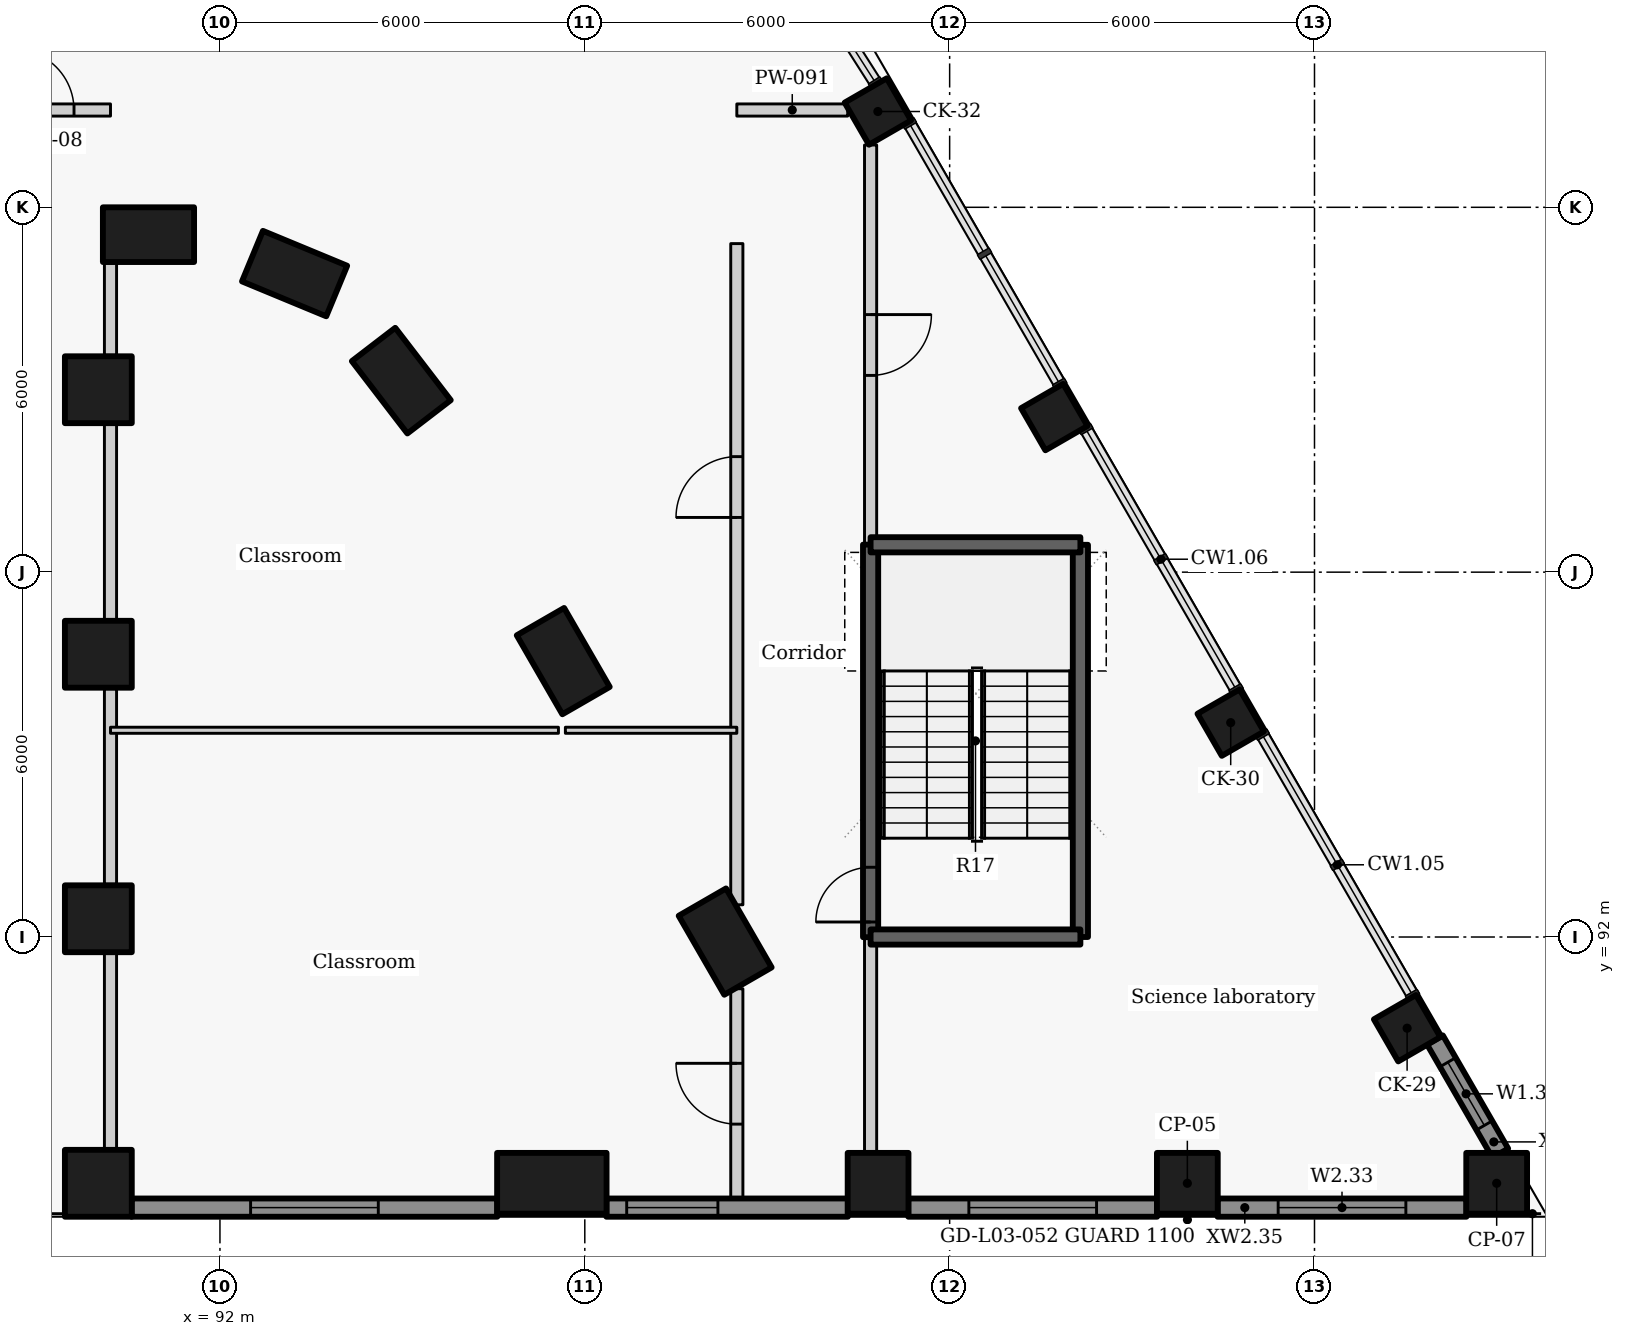
"""IFC4 building model, lengths in metres.
Left out: names, types, materials, properties, quantities, classifications, styles, units other than length and angle.
Written with IfcOpenShell. Run it as: python <this file> out.ifc"""

import sys

from ifc_helpers import new_model, si_unit, direction, frame, frame_2d, origin, origin_2d, place, context, subcontext, project, spatial, rectangle, extrude, element, fill, save


model = new_model("IFC4")
c1 = context("Model", 3, precision=1e-05, world=origin(), true_north=direction((0.0, 1.0)))
c2 = subcontext(c1, "Body", "Model", "MODEL_VIEW")
j1 = project(units=[si_unit("LENGTHUNIT", "METRE"), si_unit("PLANEANGLEUNIT", "RADIAN")], contexts=[c1])
p1 = place(None, origin())
s1 = spatial("IfcSite", under=j1, at=p1, CompositionType="ELEMENT")
p2 = place(p1, origin())
s2 = spatial("IfcBuilding", under=s1, at=p2, CompositionType="ELEMENT")
p3 = place(p2, frame((0.0, 0.0, 15.6)))
s3 = spatial("IfcBuildingStorey", under=s2, at=p3, CompositionType="ELEMENT", Elevation=15.6)
for number, where, z_axis, x_axis in (
    (1, (100.308, 91.925, 0.0), (0.0, 0.0, 1.0), (-0.5, 0.866, 0.0)),
    (2, (97.646, 96.537, 0.0), (0.0, 0.0, 1.0), (-0.5, 0.866, 0.0)),
    (3, (94.982, 101.149, 0.0), (0.0, 0.0, 1.0), (-0.609, 0.793, 0.0)),
    (4, (93.227, 102.91, 0.0), (0.0, 0.0, 1.0), (-0.924, 0.383, 0.0)),
    (5, (90.825, 103.55, 0.0), (0.0, 0.0, 1.0), (-1.0, 0.0, 0.0)),
):
    element("IfcColumn", number, at=place(p3, frame(where, z_axis=z_axis, x_axis=x_axis)), inside=s3, PredefinedType="COLUMN", context=c2, shape_type="SweptSolid", body=[
        extrude(rectangle(XDim=1.5, YDim=0.9, at=origin_2d()), origin(), (0.0, 0.0, 1.0), 4.2),
    ])
for number, where, z_axis, x_axis in (
    (6, (90.0, 87.95, 0.0), (0.0, 0.0, 1.0), (0.0, 1.0, 0.0)),
    (7, (90.0, 92.3, 0.0), (0.0, 0.0, 1.0), (0.0, 1.0, 0.0)),
    (8, (90.0, 96.65, 0.0), (0.0, 0.0, 1.0), (0.0, 1.0, 0.0)),
    (9, (90.0, 101.0, 0.0), (0.0, 0.0, 1.0), (0.0, 1.0, 0.0)),
):
    element("IfcColumn", number, at=place(p3, frame(where, z_axis=z_axis, x_axis=x_axis)), inside=s3, PredefinedType="COLUMN", context=c2, shape_type="SweptSolid", body=[
        extrude(rectangle(XDim=1.1, YDim=1.1, at=origin_2d()), origin(), (0.0, 0.0, 1.0), 4.2),
    ])
for number, where, z_axis, x_axis in (
    (10, (111.523, 90.5, 0.0), (0.0, 0.0, 1.0), (-0.5, 0.866, 0.0)),
    (11, (108.622, 95.525, 0.0), (0.0, 0.0, 1.0), (-0.5, 0.866, 0.0)),
    (12, (105.721, 100.55, 0.0), (0.0, 0.0, 1.0), (-0.5, 0.866, 0.0)),
    (13, (102.82, 105.575, 0.0), (0.0, 0.0, 1.0), (-0.5, 0.866, 0.0)),
):
    element("IfcColumn", number, at=place(p3, frame(where, z_axis=z_axis, x_axis=x_axis)), inside=s3, PredefinedType="COLUMN", context=c2, shape_type="SweptSolid", body=[
        extrude(rectangle(XDim=0.8, YDim=0.8, at=origin_2d()), origin(), (0.0, 0.0, 1.0), 4.2),
    ])
p4 = place(p3, frame((97.458, 87.95, 0.0), z_axis=(0.0, 0.0, 1.0), x_axis=(1.0, 0.0, 0.0)))
e14 = element("IfcColumn", 14, at=p4, inside=s3, PredefinedType="COLUMN", context=c2, shape_type="SweptSolid", body=[
    extrude(rectangle(XDim=1.8, YDim=1.0, at=origin_2d()), origin(), (0.0, 0.0, 1.0), 4.2),
])
for number, where, z_axis, x_axis in (
    (15, (102.823, 87.95, 0.0), (0.0, 0.0, 1.0), (1.0, 0.0, 0.0)),
    (16, (107.909, 87.95, 0.0), (0.0, 0.0, 1.0), (1.0, 0.0, 0.0)),
    (17, (112.996, 87.95, 0.0), (0.0, 0.0, 1.0), (1.0, 0.0, 0.0)),
):
    element("IfcColumn", number, at=place(p3, frame(where, z_axis=z_axis, x_axis=x_axis)), inside=s3, PredefinedType="COLUMN", context=c2, shape_type="SweptSolid", body=[
        extrude(rectangle(XDim=1.0, YDim=1.0, at=origin_2d()), origin(), (0.0, 0.0, 1.0), 4.2),
    ])
p5 = place(p3, frame((90.546, 87.55, 0.0), z_axis=(0.0, 0.0, 1.0), x_axis=(1.0, 0.0, 0.0)))
e18 = element("IfcWall", 18, at=p5, inside=s3, PredefinedType="SOLIDWALL", context=c2, shape_type="SweptSolid", body=[
    extrude(rectangle(XDim=6.016, YDim=0.3, at=frame_2d((3.008, 0.0))), origin(), (0.0, 0.0, 1.0), 3.0),
])
p6 = place(p5, frame((1.958, 0.0, 0.9)))
e19 = element("IfcOpeningElement", 19, at=p6, cuts=e18, PredefinedType="OPENING", context=c2, shape_type="SweptSolid", body=[
    extrude(rectangle(XDim=2.1, YDim=2.05, at=frame_2d((1.05, 1.025))), frame((0.0, 0.16, 0.0), z_axis=(0.0, -1.0, 0.0), x_axis=(1.0, 0.0, 0.0)), (0.0, 0.0, 1.0), 0.32),
])
p7 = place(p3, frame((98.354, 87.55, 0.0), z_axis=(0.0, 0.0, 1.0), x_axis=(1.0, 0.0, 0.0)))
e20 = element("IfcWall", 20, at=p7, inside=s3, PredefinedType="SOLIDWALL", context=c2, shape_type="SweptSolid", body=[
    extrude(rectangle(XDim=3.973, YDim=0.3, at=frame_2d((1.986, 0.0))), origin(), (0.0, 0.0, 1.0), 3.0),
])
p8 = place(p7, frame((0.335, 0.0, 0.9)))
e21 = element("IfcOpeningElement", 21, at=p8, cuts=e20, PredefinedType="OPENING", context=c2, shape_type="SweptSolid", body=[
    extrude(rectangle(XDim=1.5, YDim=2.05, at=frame_2d((0.75, 1.025))), frame((0.0, 0.16, 0.0), z_axis=(0.0, -1.0, 0.0), x_axis=(1.0, 0.0, 0.0)), (0.0, 0.0, 1.0), 0.32),
])
p9 = place(p3, frame((103.319, 87.55, 0.0), z_axis=(0.0, 0.0, 1.0), x_axis=(1.0, 0.0, 0.0)))
e22 = element("IfcWall", 22, at=p9, inside=s3, PredefinedType="SOLIDWALL", context=c2, shape_type="SweptSolid", body=[
    extrude(rectangle(XDim=4.094, YDim=0.3, at=frame_2d((2.047, 0.0))), origin(), (0.0, 0.0, 1.0), 3.0),
])
p10 = place(p9, frame((0.997, 0.0, 0.9)))
e23 = element("IfcOpeningElement", 23, at=p10, cuts=e22, PredefinedType="OPENING", context=c2, shape_type="SweptSolid", body=[
    extrude(rectangle(XDim=2.1, YDim=2.05, at=frame_2d((1.05, 1.025))), frame((0.0, 0.16, 0.0), z_axis=(0.0, -1.0, 0.0), x_axis=(1.0, 0.0, 0.0)), (0.0, 0.0, 1.0), 0.32),
])
p11 = place(p3, frame((108.405, 87.55, 0.0), z_axis=(0.0, 0.0, 1.0), x_axis=(1.0, 0.0, 0.0)))
e24 = element("IfcWall", 24, at=p11, inside=s3, PredefinedType="SOLIDWALL", context=c2, shape_type="SweptSolid", body=[
    extrude(rectangle(XDim=4.095, YDim=0.3, at=frame_2d((2.047, 0.0))), origin(), (0.0, 0.0, 1.0), 3.0),
])
p12 = place(p11, frame((0.998, 0.0, 0.9)))
e25 = element("IfcOpeningElement", 25, at=p12, cuts=e24, PredefinedType="OPENING", context=c2, shape_type="SweptSolid", body=[
    extrude(rectangle(XDim=2.1, YDim=2.05, at=frame_2d((1.05, 1.025))), frame((0.0, 0.16, 0.0), z_axis=(0.0, -1.0, 0.0), x_axis=(1.0, 0.0, 0.0)), (0.0, 0.0, 1.0), 0.32),
])
p13 = place(p3, frame((113.055, 88.447, 0.0), z_axis=(0.0, 0.0, 1.0), x_axis=(-0.499987977232, 0.866032345022, 0.0)))
e26 = element("IfcWall", 26, at=p13, inside=s3, PredefinedType="SOLIDWALL", context=c2, shape_type="SweptSolid", body=[
    extrude(rectangle(XDim=2.149, YDim=0.3, at=frame_2d((1.074, 0.0))), origin(), (0.0, 0.0, 1.0), 3.0),
])
p14 = place(p13, frame((0.525, 0.0, 0.9)))
e27 = element("IfcOpeningElement", 27, at=p14, cuts=e26, PredefinedType="OPENING", context=c2, shape_type="SweptSolid", body=[
    extrude(rectangle(XDim=1.2, YDim=2.05, at=frame_2d((0.6, 1.025))), frame((0.0, 0.16, 0.0), z_axis=(0.0, -1.0, 0.0), x_axis=(1.0, 0.0, 0.0)), (0.0, 0.0, 1.0), 0.32),
])
p15 = place(p3, frame((102.7, 91.997, -0.3), z_axis=(0.0, 0.0, 1.0), x_axis=(0.0, 1.0, 0.0)))
e28 = element("IfcWall", 28, at=p15, inside=s3, PredefinedType="SHEAR", context=c2, shape_type="SweptSolid", body=[
    extrude(rectangle(XDim=6.456, YDim=0.25, at=frame_2d((3.228, 0.0))), origin(), (0.0, 0.0, 1.0), 4.2),
])
p16 = place(p15, frame((0.25, 0.0, 0.3)))
e29 = element("IfcOpeningElement", 29, at=p16, cuts=e28, PredefinedType="OPENING", context=c2, shape_type="SweptSolid", body=[
    extrude(rectangle(XDim=0.9, YDim=2.1, at=frame_2d((0.45, 1.05))), frame((0.0, 0.135, 0.0), z_axis=(0.0, -1.0, 0.0), x_axis=(1.0, 0.0, 0.0)), (0.0, 0.0, 1.0), 0.27),
])
p17 = place(p3, frame((102.7, 88.467, 0.0), z_axis=(0.0, 0.0, 1.0), x_axis=(0.0, 1.0, 0.0)))
e30 = element("IfcWall", 30, at=p17, inside=s3, PredefinedType="PARTITIONING", context=c2, shape_type="SweptSolid", body=[
    extrude(rectangle(XDim=3.536, YDim=0.2, at=frame_2d((1.768, 0.0))), origin(), (0.0, 0.0, 1.0), 3.9),
])
p18 = place(p3, frame((102.7, 105.025, 0.0), z_axis=(0.0, 0.0, 1.0), x_axis=(0.0, -1.0, 0.0)))
e31 = element("IfcWall", 31, at=p18, inside=s3, PredefinedType="PARTITIONING", context=c2, shape_type="SweptSolid", body=[
    extrude(rectangle(XDim=6.578, YDim=0.2, at=frame_2d((3.289, 0.0))), origin(), (0.0, 0.0, 1.0), 3.9),
])
p19 = place(p18, frame((2.789, 0.0, 0.0)))
e32 = element("IfcOpeningElement", 32, at=p19, cuts=e31, PredefinedType="OPENING", context=c2, shape_type="SweptSolid", body=[
    extrude(rectangle(XDim=1.0, YDim=2.1, at=frame_2d((0.5, 1.05))), frame((0.0, 0.11, 0.0), z_axis=(0.0, -1.0, 0.0), x_axis=(1.0, 0.0, 0.0)), (0.0, 0.0, 1.0), 0.22),
])
p20 = place(p3, frame((100.5, 87.7, 0.0), z_axis=(0.0, 0.0, 1.0), x_axis=(0.0, 1.0, 0.0)))
e33 = element("IfcWall", 33, at=p20, inside=s3, PredefinedType="PARTITIONING", context=c2, shape_type="SweptSolid", body=[
    extrude(rectangle(XDim=3.449, YDim=0.2, at=frame_2d((1.725, 0.0))), origin(), (0.0, 0.0, 1.0), 3.13),
])
p21 = place(p20, frame((1.223, 0.0, 0.0)))
e34 = element("IfcOpeningElement", 34, at=p21, cuts=e33, PredefinedType="OPENING", context=c2, shape_type="SweptSolid", body=[
    extrude(rectangle(XDim=1.0, YDim=2.1, at=frame_2d((0.5, 1.05))), frame((0.0, 0.11, 0.0), z_axis=(0.0, -1.0, 0.0), x_axis=(1.0, 0.0, 0.0)), (0.0, 0.0, 1.0), 0.22),
])
p22 = place(p3, frame((100.5, 92.53, 0.0), z_axis=(0.0, 0.0, 1.0), x_axis=(0.0, 1.0, 0.0)))
e35 = element("IfcWall", 35, at=p22, inside=s3, PredefinedType="PARTITIONING", context=c2, shape_type="SweptSolid", body=[
    extrude(rectangle(XDim=10.873, YDim=0.2, at=frame_2d((5.437, 0.0))), origin(), (0.0, 0.0, 1.0), 3.9),
])
p23 = place(p22, frame((6.37, 0.0, 0.0)))
e36 = element("IfcOpeningElement", 36, at=p23, cuts=e35, PredefinedType="OPENING", context=c2, shape_type="SweptSolid", body=[
    extrude(rectangle(XDim=1.0, YDim=2.1, at=frame_2d((0.5, 1.05))), frame((0.0, 0.11, 0.0), z_axis=(0.0, -1.0, 0.0), x_axis=(1.0, 0.0, 0.0)), (0.0, 0.0, 1.0), 0.22),
])
p24 = place(p3, frame((69.8, 105.6, 0.0), z_axis=(0.0, 0.0, 1.0), x_axis=(1.0, 0.0, 0.0)))
e37 = element("IfcWall", 37, at=p24, inside=s3, PredefinedType="PARTITIONING", context=c2, shape_type="SweptSolid", body=[
    extrude(rectangle(XDim=20.4, YDim=0.2, at=frame_2d((10.2, 0.0))), origin(), (0.0, 0.0, 1.0), 3.9),
])
p25 = place(p24, frame((0.602, 0.0, 0.0)))
e38 = element("IfcOpeningElement", 38, at=p25, cuts=e37, PredefinedType="OPENING", context=c2, shape_type="SweptSolid", body=[
    extrude(rectangle(XDim=1.0, YDim=2.1, at=frame_2d((0.5, 1.05))), frame((0.0, 0.11, 0.0), z_axis=(0.0, -1.0, 0.0), x_axis=(1.0, 0.0, 0.0)), (0.0, 0.0, 1.0), 0.22),
])
p26 = place(p24, frame((18.8, 0.0, 0.0)))
e39 = element("IfcOpeningElement", 39, at=p26, cuts=e37, PredefinedType="OPENING", context=c2, shape_type="SweptSolid", body=[
    extrude(rectangle(XDim=1.0, YDim=2.1, at=frame_2d((0.5, 1.05))), frame((0.0, 0.11, 0.0), z_axis=(0.0, -1.0, 0.0), x_axis=(1.0, 0.0, 0.0)), (0.0, 0.0, 1.0), 0.22),
])
p27 = place(p24, frame((10.3, 0.0, 0.0)))
e40 = element("IfcOpeningElement", 40, at=p27, cuts=e37, PredefinedType="OPENING", context=c2, shape_type="SweptSolid", body=[
    extrude(rectangle(XDim=1.0, YDim=2.1, at=frame_2d((0.5, 1.05))), frame((0.0, 0.11, 0.0), z_axis=(0.0, -1.0, 0.0), x_axis=(1.0, 0.0, 0.0)), (0.0, 0.0, 1.0), 0.22),
])
p28 = place(p3, frame((100.5, 105.6, 0.0), z_axis=(0.0, 0.0, 1.0), x_axis=(1.0, 0.0, 0.0)))
e41 = element("IfcWall", 41, at=p28, inside=s3, PredefinedType="PARTITIONING", context=c2, shape_type="SweptSolid", body=[
    extrude(rectangle(XDim=1.823, YDim=0.2, at=frame_2d((0.912, 0.0))), origin(), (0.0, 0.0, 1.0), 3.9),
])
p29 = place(p3, frame((90.2, 88.517, 0.0), z_axis=(0.0, 0.0, 1.0), x_axis=(0.0, 1.0, 0.0)))
e42 = element("IfcWall", 42, at=p29, inside=s3, PredefinedType="PARTITIONING", context=c2, shape_type="SweptSolid", body=[
    extrude(rectangle(XDim=3.216, YDim=0.2, at=frame_2d((1.608, 0.0))), origin(), (0.0, 0.0, 1.0), 3.13),
])
for number, where, z_axis, x_axis in (
    (43, (90.2, 92.867, 0.0), (0.0, 0.0, 1.0), (0.0, 1.0, 0.0)),
    (44, (90.2, 97.217, 0.0), (0.0, 0.0, 1.0), (0.0, 1.0, 0.0)),
):
    element("IfcWall", number, at=place(p3, frame(where, z_axis=z_axis, x_axis=x_axis)), inside=s3, PredefinedType="PARTITIONING", context=c2, shape_type="SweptSolid", body=[
        extrude(rectangle(XDim=3.216, YDim=0.2, at=frame_2d((1.608, 0.0))), origin(), (0.0, 0.0, 1.0), 3.13),
    ])
p30 = place(p3, frame((90.2, 101.567, 0.0), z_axis=(0.0, 0.0, 1.0), x_axis=(0.0, 1.0, 0.0)))
e45 = element("IfcWall", 45, at=p30, inside=s3, PredefinedType="PARTITIONING", context=c2, shape_type="SweptSolid", body=[
    extrude(rectangle(XDim=1.516, YDim=0.2, at=frame_2d((0.758, 0.0))), origin(), (0.0, 0.0, 1.0), 3.9),
])
p31 = place(p3, frame((106.15, 92.0, -0.3), z_axis=(0.0, 0.0, 1.0), x_axis=(0.0, 1.0, 0.0)))
e46 = element("IfcWall", 46, at=p31, inside=s3, PredefinedType="SHEAR", context=c2, shape_type="SweptSolid", body=[
    extrude(rectangle(XDim=6.45, YDim=0.25, at=frame_2d((3.225, 0.0))), origin(), (0.0, 0.0, 1.0), 4.2),
])
for number, where, z_axis, x_axis in (
    (47, (102.7, 98.45, -0.3), (0.0, 0.0, 1.0), (1.0, 0.0, 0.0)),
    (48, (102.7, 92.0, -0.3), (0.0, 0.0, 1.0), (1.0, 0.0, 0.0)),
):
    element("IfcWall", number, at=place(p3, frame(where, z_axis=z_axis, x_axis=x_axis)), inside=s3, PredefinedType="SHEAR", context=c2, shape_type="SweptSolid", body=[
        extrude(rectangle(XDim=3.45, YDim=0.25, at=frame_2d((1.725, 0.0))), origin(), (0.0, 0.0, 1.0), 4.2),
    ])
p32 = place(p3, frame((90.2, 95.4, 0.0), z_axis=(0.0, 0.0, 1.0), x_axis=(1.0, 0.0, 0.0)))
e49 = element("IfcWall", 49, at=p32, inside=s3, PredefinedType="PARTITIONING", context=c2, shape_type="SweptSolid", body=[
    extrude(rectangle(XDim=7.366, YDim=0.1, at=frame_2d((3.683, 0.0))), origin(), (0.0, 0.0, 1.0), 3.9),
])
p33 = place(p3, frame((97.68, 95.4, 0.0), z_axis=(0.0, 0.0, 1.0), x_axis=(1.0, 0.0, 0.0)))
e50 = element("IfcWall", 50, at=p33, inside=s3, PredefinedType="PARTITIONING", context=c2, shape_type="SweptSolid", body=[
    extrude(rectangle(XDim=2.82, YDim=0.1, at=frame_2d((1.41, 0.0))), origin(), (0.0, 0.0, 1.0), 2.98),
])
p34 = place(p6, origin())
e51 = element("IfcWindow", 51, at=p34, inside=s3, PartitioningType="SINGLE_PANEL", PredefinedType="WINDOW", context=c2, shape_type="SweptSolid", body=[
    extrude(rectangle(XDim=2.1, YDim=2.05, at=frame_2d((1.05, 1.025))), frame((0.0, 0.03, 0.0), z_axis=(0.0, -1.0, 0.0), x_axis=(1.0, 0.0, 0.0)), (0.0, 0.0, 1.0), 0.06),
])
fill(e19, e51)
p35 = place(p8, origin())
e52 = element("IfcWindow", 52, at=p35, inside=s3, PartitioningType="SINGLE_PANEL", PredefinedType="WINDOW", context=c2, shape_type="SweptSolid", body=[
    extrude(rectangle(XDim=1.5, YDim=2.05, at=frame_2d((0.75, 1.025))), frame((0.0, 0.03, 0.0), z_axis=(0.0, -1.0, 0.0), x_axis=(1.0, 0.0, 0.0)), (0.0, 0.0, 1.0), 0.06),
])
fill(e21, e52)
p36 = place(p10, origin())
e53 = element("IfcWindow", 53, at=p36, inside=s3, PartitioningType="SINGLE_PANEL", PredefinedType="WINDOW", context=c2, shape_type="SweptSolid", body=[
    extrude(rectangle(XDim=2.1, YDim=2.05, at=frame_2d((1.05, 1.025))), frame((0.0, 0.03, 0.0), z_axis=(0.0, -1.0, 0.0), x_axis=(1.0, 0.0, 0.0)), (0.0, 0.0, 1.0), 0.06),
])
fill(e23, e53)
p37 = place(p12, origin())
e54 = element("IfcWindow", 54, at=p37, inside=s3, PartitioningType="SINGLE_PANEL", PredefinedType="WINDOW", context=c2, shape_type="SweptSolid", body=[
    extrude(rectangle(XDim=2.1, YDim=2.05, at=frame_2d((1.05, 1.025))), frame((0.0, 0.03, 0.0), z_axis=(0.0, -1.0, 0.0), x_axis=(1.0, 0.0, 0.0)), (0.0, 0.0, 1.0), 0.06),
])
fill(e25, e54)
p38 = place(p14, origin())
e55 = element("IfcWindow", 55, at=p38, inside=s3, PartitioningType="SINGLE_PANEL", PredefinedType="WINDOW", context=c2, shape_type="SweptSolid", body=[
    extrude(rectangle(XDim=1.2, YDim=2.05, at=frame_2d((0.6, 1.025))), frame((0.0, 0.03, 0.0), z_axis=(0.0, -1.0, 0.0), x_axis=(1.0, 0.0, 0.0)), (0.0, 0.0, 1.0), 0.06),
])
fill(e27, e55)
p39 = place(p16, origin())
e56 = element("IfcDoor", 56, at=p39, inside=s3, OperationType="SINGLE_SWING_LEFT", PredefinedType="DOOR", context=c2, shape_type="SweptSolid", body=[
    extrude(rectangle(XDim=0.9, YDim=2.1, at=frame_2d((0.45, 1.05))), frame((0.0, 0.025, 0.0), z_axis=(0.0, -1.0, 0.0), x_axis=(1.0, 0.0, 0.0)), (0.0, 0.0, 1.0), 0.05),
])
fill(e29, e56)
p40 = place(p19, origin())
e57 = element("IfcDoor", 57, at=p40, inside=s3, OperationType="SINGLE_SWING_LEFT", PredefinedType="DOOR", context=c2, shape_type="SweptSolid", body=[
    extrude(rectangle(XDim=1.0, YDim=2.1, at=frame_2d((0.5, 1.05))), frame((0.0, 0.025, 0.0), z_axis=(0.0, -1.0, 0.0), x_axis=(1.0, 0.0, 0.0)), (0.0, 0.0, 1.0), 0.05),
])
fill(e32, e57)
p41 = place(p21, origin())
e58 = element("IfcDoor", 58, at=p41, inside=s3, OperationType="SINGLE_SWING_RIGHT", PredefinedType="DOOR", context=c2, shape_type="SweptSolid", body=[
    extrude(rectangle(XDim=1.0, YDim=2.1, at=frame_2d((0.5, 1.05))), frame((0.0, 0.025, 0.0), z_axis=(0.0, -1.0, 0.0), x_axis=(1.0, 0.0, 0.0)), (0.0, 0.0, 1.0), 0.05),
])
fill(e34, e58)
p42 = place(p23, origin())
e59 = element("IfcDoor", 59, at=p42, inside=s3, OperationType="SINGLE_SWING_LEFT", PredefinedType="DOOR", context=c2, shape_type="SweptSolid", body=[
    extrude(rectangle(XDim=1.0, YDim=2.1, at=frame_2d((0.5, 1.05))), frame((0.0, 0.025, 0.0), z_axis=(0.0, -1.0, 0.0), x_axis=(1.0, 0.0, 0.0)), (0.0, 0.0, 1.0), 0.05),
])
fill(e36, e59)
p43 = place(p26, origin())
e60 = element("IfcDoor", 60, at=p43, inside=s3, OperationType="SINGLE_SWING_LEFT", PredefinedType="DOOR", context=c2, shape_type="SweptSolid", body=[
    extrude(rectangle(XDim=1.0, YDim=2.1, at=frame_2d((0.5, 1.05))), frame((0.0, 0.025, 0.0), z_axis=(0.0, -1.0, 0.0), x_axis=(1.0, 0.0, 0.0)), (0.0, 0.0, 1.0), 0.05),
])
fill(e39, e60)
save(model, sys.argv[1])
